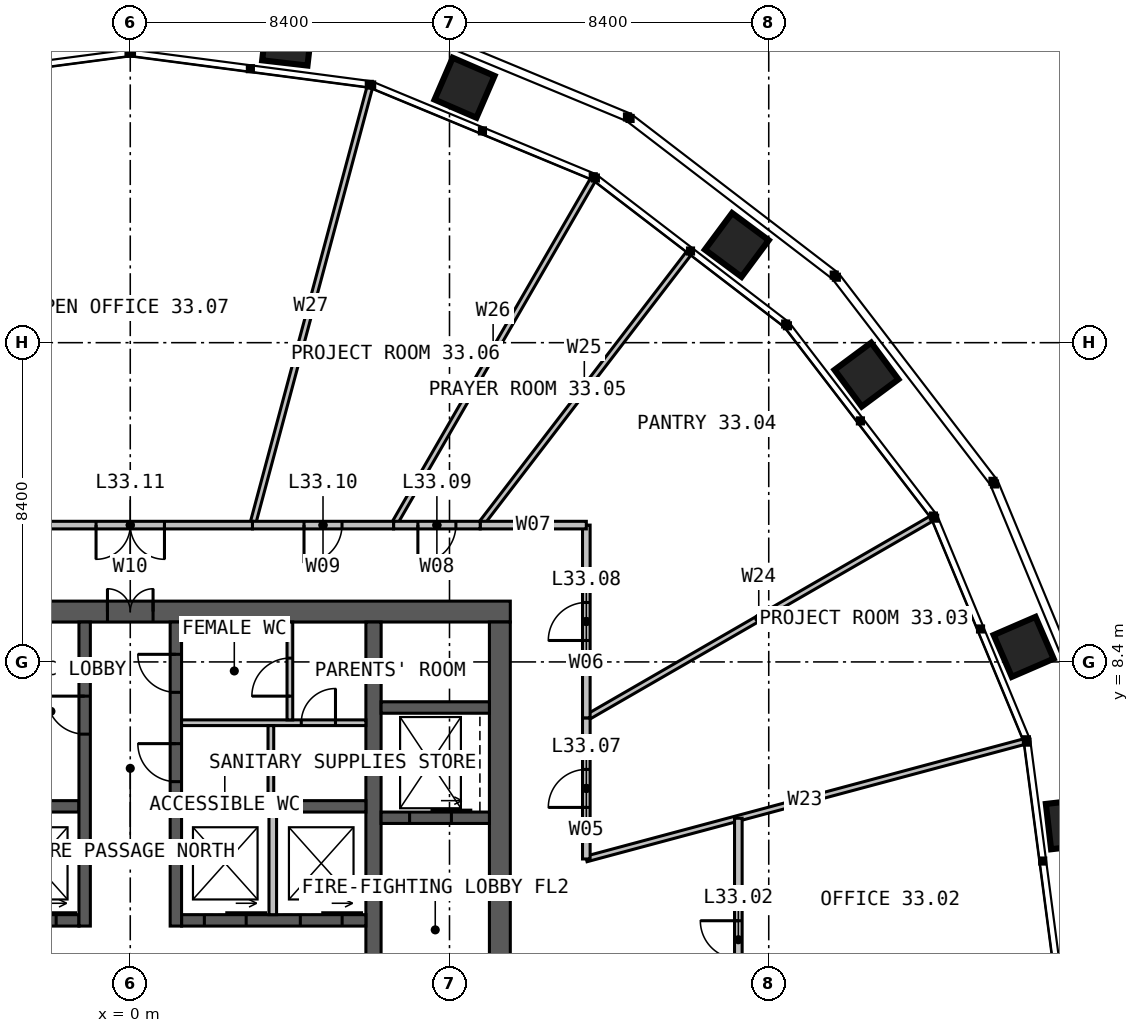
"""IFC4 building model, lengths in metres.
Left out: names, types, materials, properties, quantities, classifications, styles, units other than length and angle.
Written with IfcOpenShell. Run it as: python <this file> out.ifc"""

import sys

from ifc_helpers import new_model, si_unit, direction, frame, frame_2d, origin, place, context, subcontext, project, spatial, rectangle, extrude, element, fill, save


model = new_model("IFC4")
c1 = context("Model", 3, precision=1e-05, world=origin(), true_north=direction((0.0, 1.0)))
c2 = subcontext(c1, "Body", "Model", "MODEL_VIEW")
j1 = project(units=[si_unit("LENGTHUNIT", "METRE"), si_unit("PLANEANGLEUNIT", "RADIAN")], contexts=[c1])
p1 = place(None, origin())
s1 = spatial("IfcSite", under=j1, at=p1, CompositionType="ELEMENT")
p2 = place(p1, origin())
s2 = spatial("IfcBuilding", under=s1, at=p2, CompositionType="ELEMENT")
p3 = place(p2, frame((0.0, 0.0, 138.0)))
s3 = spatial("IfcBuildingStorey", under=s2, at=p3, CompositionType="ELEMENT", Elevation=138.0)
p4 = place(p3, frame((-10.0, 9.725, 0.0), z_axis=(0.0, 0.0, 1.0), x_axis=(1.0, 0.0, 0.0)))
e1 = element("IfcWall", 1, at=p4, inside=s3, PredefinedType="SOLIDWALL", context=c2, shape_type="SweptSolid", body=[
    extrude(rectangle(XDim=20.0, YDim=0.55, at=frame_2d((10.0, 0.0))), origin(), (0.0, 0.0, 1.0), 4.0),
])
p5 = place(p4, frame((9.4, 0.0, 0.0)))
e2 = element("IfcOpeningElement", 2, at=p5, cuts=e1, PredefinedType="OPENING", context=c2, shape_type="SweptSolid", body=[
    extrude(rectangle(XDim=1.2, YDim=2.2, at=frame_2d((0.6, 1.1))), frame((0.0, 0.285, 0.0), z_axis=(0.0, -1.0, 0.0), x_axis=(1.0, 0.0, 0.0)), (0.0, 0.0, 1.0), 0.57),
])
p6 = place(p3, frame((9.725, -9.45, 0.0), z_axis=(0.0, 0.0, 1.0), x_axis=(0.0, 1.0, 0.0)))
e3 = element("IfcWall", 3, at=p6, inside=s3, PredefinedType="SOLIDWALL", context=c2, shape_type="SweptSolid", body=[
    extrude(rectangle(XDim=18.9, YDim=0.55, at=frame_2d((9.45, 0.0))), origin(), (0.0, 0.0, 1.0), 4.0),
])
p7 = place(p3, frame((6.4, 9.45, 0.0), z_axis=(0.0, 0.0, 1.0), x_axis=(0.0, -1.0, 0.0)))
e4 = element("IfcWall", 4, at=p7, inside=s3, PredefinedType="SOLIDWALL", context=c2, shape_type="SweptSolid", body=[
    extrude(rectangle(XDim=18.9, YDim=0.4, at=frame_2d((9.45, 0.0))), origin(), (0.0, 0.0, 1.0), 4.0),
])
p8 = place(p7, frame((8.95, 0.0, 0.0)))
e5 = element("IfcOpeningElement", 5, at=p8, cuts=e4, PredefinedType="OPENING", context=c2, shape_type="SweptSolid", body=[
    extrude(rectangle(XDim=1.0, YDim=2.2, at=frame_2d((0.5, 1.1))), frame((0.0, 0.21, 0.0), z_axis=(0.0, -1.0, 0.0), x_axis=(1.0, 0.0, 0.0)), (0.0, 0.0, 1.0), 0.42),
])
p9 = place(p3, frame((-6.2, 1.6, 0.0), z_axis=(0.0, 0.0, 1.0), x_axis=(1.0, 0.0, 0.0)))
e6 = element("IfcWall", 6, at=p9, inside=s3, PredefinedType="SOLIDWALL", context=c2, shape_type="SweptSolid", body=[
    extrude(rectangle(XDim=4.85, YDim=0.3, at=frame_2d((2.425, 0.0))), origin(), (0.0, 0.0, 1.0), 4.0),
])
p10 = place(p9, frame((0.625, 0.0, 0.0)))
e7 = element("IfcOpeningElement", 7, at=p10, cuts=e6, PredefinedType="OPENING", context=c2, shape_type="SweptSolid", body=[
    extrude(rectangle(XDim=1.1, YDim=2.2, at=frame_2d((0.55, 1.1))), frame((0.0, 0.16, 0.0), z_axis=(0.0, -1.0, 0.0), x_axis=(1.0, 0.0, 0.0)), (0.0, 0.0, 1.0), 0.32),
])
p11 = place(p9, frame((3.15, 0.0, 0.0)))
e8 = element("IfcOpeningElement", 8, at=p11, cuts=e6, PredefinedType="OPENING", context=c2, shape_type="SweptSolid", body=[
    extrude(rectangle(XDim=1.1, YDim=2.2, at=frame_2d((0.55, 1.1))), frame((0.0, 0.16, 0.0), z_axis=(0.0, -1.0, 0.0), x_axis=(1.0, 0.0, 0.0)), (0.0, 0.0, 1.0), 0.32),
])
p12 = place(p3, frame((1.35, 1.6, 0.0), z_axis=(0.0, 0.0, 1.0), x_axis=(1.0, 0.0, 0.0)))
e9 = element("IfcWall", 9, at=p12, inside=s3, PredefinedType="SOLIDWALL", context=c2, shape_type="SweptSolid", body=[
    extrude(rectangle(XDim=4.85, YDim=0.3, at=frame_2d((2.425, 0.0))), origin(), (0.0, 0.0, 1.0), 4.0),
])
p13 = place(p12, frame((0.6, 0.0, 0.0)))
e10 = element("IfcOpeningElement", 10, at=p13, cuts=e9, PredefinedType="OPENING", context=c2, shape_type="SweptSolid", body=[
    extrude(rectangle(XDim=1.1, YDim=2.2, at=frame_2d((0.55, 1.1))), frame((0.0, 0.16, 0.0), z_axis=(0.0, -1.0, 0.0), x_axis=(1.0, 0.0, 0.0)), (0.0, 0.0, 1.0), 0.32),
])
p14 = place(p12, frame((3.125, 0.0, 0.0)))
e11 = element("IfcOpeningElement", 11, at=p14, cuts=e9, PredefinedType="OPENING", context=c2, shape_type="SweptSolid", body=[
    extrude(rectangle(XDim=1.1, YDim=2.2, at=frame_2d((0.55, 1.1))), frame((0.0, 0.16, 0.0), z_axis=(0.0, -1.0, 0.0), x_axis=(1.0, 0.0, 0.0)), (0.0, 0.0, 1.0), 0.32),
])
for number, where, z_axis, x_axis in (
    (12, (-6.2, 4.6, 0.0), (0.0, 0.0, 1.0), (1.0, 0.0, 0.0)),
    (13, (1.35, 4.6, 0.0), (0.0, 0.0, 1.0), (1.0, 0.0, 0.0)),
):
    element("IfcWall", number, at=place(p3, frame(where, z_axis=z_axis, x_axis=x_axis)), inside=s3, PredefinedType="SOLIDWALL", context=c2, shape_type="SweptSolid", body=[
        extrude(rectangle(XDim=4.85, YDim=0.3, at=frame_2d((2.425, 0.0))), origin(), (0.0, 0.0, 1.0), 4.0),
    ])
p15 = place(p3, frame((-1.2, 1.45, 0.0), z_axis=(0.0, 0.0, 1.0), x_axis=(0.0, 1.0, 0.0)))
e14 = element("IfcWall", 14, at=p15, inside=s3, PredefinedType="SOLIDWALL", context=c2, shape_type="SweptSolid", body=[
    extrude(rectangle(XDim=8.0, YDim=0.3, at=frame_2d((4.0, 0.0))), origin(), (0.0, 0.0, 1.0), 4.0),
])
p16 = place(p15, frame((5.05, 0.0, 0.0)))
e15 = element("IfcOpeningElement", 15, at=p16, cuts=e14, PredefinedType="OPENING", context=c2, shape_type="SweptSolid", body=[
    extrude(rectangle(XDim=1.0, YDim=2.2, at=frame_2d((0.5, 1.1))), frame((0.0, 0.16, 0.0), z_axis=(0.0, -1.0, 0.0), x_axis=(1.0, 0.0, 0.0)), (0.0, 0.0, 1.0), 0.32),
])
p17 = place(p3, frame((1.2, 1.45, 0.0), z_axis=(0.0, 0.0, 1.0), x_axis=(0.0, 1.0, 0.0)))
e16 = element("IfcWall", 16, at=p17, inside=s3, PredefinedType="SOLIDWALL", context=c2, shape_type="SweptSolid", body=[
    extrude(rectangle(XDim=8.0, YDim=0.3, at=frame_2d((4.0, 0.0))), origin(), (0.0, 0.0, 1.0), 4.0),
])
p18 = place(p17, frame((3.8, 0.0, 0.0)))
e17 = element("IfcOpeningElement", 17, at=p18, cuts=e16, PredefinedType="OPENING", context=c2, shape_type="SweptSolid", body=[
    extrude(rectangle(XDim=1.0, YDim=2.2, at=frame_2d((0.5, 1.1))), frame((0.0, 0.16, 0.0), z_axis=(0.0, -1.0, 0.0), x_axis=(1.0, 0.0, 0.0)), (0.0, 0.0, 1.0), 0.32),
])
p19 = place(p17, frame((6.15, 0.0, 0.0)))
e18 = element("IfcOpeningElement", 18, at=p19, cuts=e16, PredefinedType="OPENING", context=c2, shape_type="SweptSolid", body=[
    extrude(rectangle(XDim=1.0, YDim=2.2, at=frame_2d((0.5, 1.1))), frame((0.0, 0.16, 0.0), z_axis=(0.0, -1.0, 0.0), x_axis=(1.0, 0.0, 0.0)), (0.0, 0.0, 1.0), 0.32),
])
p20 = place(p3, frame((6.6, 4.3, 0.0), z_axis=(0.0, 0.0, 1.0), x_axis=(1.0, 0.0, 0.0)))
e19 = element("IfcWall", 19, at=p20, inside=s3, PredefinedType="SOLIDWALL", context=c2, shape_type="SweptSolid", body=[
    extrude(rectangle(XDim=2.85, YDim=0.3, at=frame_2d((1.425, 0.0))), origin(), (0.0, 0.0, 1.0), 4.0),
])
p21 = place(p20, frame((0.75, 0.0, 0.0)))
e20 = element("IfcOpeningElement", 20, at=p21, cuts=e19, PredefinedType="OPENING", context=c2, shape_type="SweptSolid", body=[
    extrude(rectangle(XDim=1.1, YDim=2.2, at=frame_2d((0.55, 1.1))), frame((0.0, 0.16, 0.0), z_axis=(0.0, -1.0, 0.0), x_axis=(1.0, 0.0, 0.0)), (0.0, 0.0, 1.0), 0.32),
])
p22 = place(p3, frame((6.6, 7.2, 0.0), z_axis=(0.0, 0.0, 1.0), x_axis=(1.0, 0.0, 0.0)))
e21 = element("IfcWall", 21, at=p22, inside=s3, PredefinedType="SOLIDWALL", context=c2, shape_type="SweptSolid", body=[
    extrude(rectangle(XDim=2.85, YDim=0.3, at=frame_2d((1.425, 0.0))), origin(), (0.0, 0.0, 1.0), 4.0),
])
p23 = place(p3, frame((3.75, 1.75, 0.0), z_axis=(0.0, 0.0, 1.0), x_axis=(0.0, 1.0, 0.0)))
e22 = element("IfcWall", 22, at=p23, inside=s3, PredefinedType="SOLIDWALL", context=c2, shape_type="SweptSolid", body=[
    extrude(rectangle(XDim=2.7, YDim=0.2, at=frame_2d((1.35, 0.0))), origin(), (0.0, 0.0, 1.0), 3.75),
])
p24 = place(p3, frame((1.35, 6.8, 0.0), z_axis=(0.0, 0.0, 1.0), x_axis=(1.0, 0.0, 0.0)))
e23 = element("IfcWall", 23, at=p24, inside=s3, PredefinedType="PARTITIONING", context=c2, shape_type="SweptSolid", body=[
    extrude(rectangle(XDim=4.85, YDim=0.15, at=frame_2d((2.425, 0.0))), origin(), (0.0, 0.0, 1.0), 3.75),
])
p25 = place(p24, frame((3.15, 0.0, 0.0)))
e24 = element("IfcOpeningElement", 24, at=p25, cuts=e23, PredefinedType="OPENING", context=c2, shape_type="SweptSolid", body=[
    extrude(rectangle(XDim=0.9, YDim=2.2, at=frame_2d((0.45, 1.1))), frame((0.0, 0.085, 0.0), z_axis=(0.0, -1.0, 0.0), x_axis=(1.0, 0.0, 0.0)), (0.0, 0.0, 1.0), 0.17),
])
p26 = place(p3, frame((3.7, 4.75, 0.0), z_axis=(0.0, 0.0, 1.0), x_axis=(0.0, 1.0, 0.0)))
e25 = element("IfcWall", 25, at=p26, inside=s3, PredefinedType="PARTITIONING", context=c2, shape_type="SweptSolid", body=[
    extrude(rectangle(XDim=1.975, YDim=0.15, at=frame_2d((0.988, 0.0))), origin(), (0.0, 0.0, 1.0), 3.75),
])
p27 = place(p3, frame((4.2, 6.875, 0.0), z_axis=(0.0, 0.0, 1.0), x_axis=(0.0, 1.0, 0.0)))
e26 = element("IfcWall", 26, at=p27, inside=s3, PredefinedType="PARTITIONING", context=c2, shape_type="SweptSolid", body=[
    extrude(rectangle(XDim=2.575, YDim=0.15, at=frame_2d((1.288, 0.0))), origin(), (0.0, 0.0, 1.0), 3.75),
])
p28 = place(p27, frame((0.625, 0.0, 0.0)))
e27 = element("IfcOpeningElement", 27, at=p28, cuts=e26, PredefinedType="OPENING", context=c2, shape_type="SweptSolid", body=[
    extrude(rectangle(XDim=1.0, YDim=2.2, at=frame_2d((0.5, 1.1))), frame((0.0, 0.085, 0.0), z_axis=(0.0, -1.0, 0.0), x_axis=(1.0, 0.0, 0.0)), (0.0, 0.0, 1.0), 0.17),
])
p29 = place(p3, frame((12.0, 3.215, 0.0), z_axis=(0.0, 0.0, 1.0), x_axis=(0.965926367889, 0.258817023816, 0.0)))
e28 = element("IfcWall", 28, at=p29, inside=s3, PredefinedType="PARTITIONING", context=c2, shape_type="SweptSolid", body=[
    extrude(rectangle(XDim=11.911, YDim=0.15, at=frame_2d((5.956, 0.0))), origin(), (0.0, 0.0, 1.0), 2.79),
])
p30 = place(p3, frame((12.0, 6.928, 0.0), z_axis=(0.0, 0.0, 1.0), x_axis=(0.866029212144, 0.49999340367, 0.0)))
e29 = element("IfcWall", 29, at=p30, inside=s3, PredefinedType="PARTITIONING", context=c2, shape_type="SweptSolid", body=[
    extrude(rectangle(XDim=10.478, YDim=0.15, at=frame_2d((5.239, 0.0))), origin(), (0.0, 0.0, 1.0), 2.79),
])
p31 = place(p3, frame((9.208, 12.0, 0.0), z_axis=(0.0, 0.0, 1.0), x_axis=(0.608761217002, 0.79335350297, 0.0)))
e30 = element("IfcWall", 30, at=p31, inside=s3, PredefinedType="PARTITIONING", context=c2, shape_type="SweptSolid", body=[
    extrude(rectangle(XDim=9.0, YDim=0.15, at=frame_2d((4.5, 0.0))), origin(), (0.0, 0.0, 1.0), 2.79),
])
p32 = place(p3, frame((6.928, 12.0, 0.0), z_axis=(0.0, 0.0, 1.0), x_axis=(0.49999340367, 0.866029212144, 0.0)))
e31 = element("IfcWall", 31, at=p32, inside=s3, PredefinedType="PARTITIONING", context=c2, shape_type="SweptSolid", body=[
    extrude(rectangle(XDim=10.478, YDim=0.15, at=frame_2d((5.239, 0.0))), origin(), (0.0, 0.0, 1.0), 2.79),
])
p33 = place(p3, frame((3.215, 12.0, 0.0), z_axis=(0.0, 0.0, 1.0), x_axis=(0.258817023816, 0.965926367889, 0.0)))
e32 = element("IfcWall", 32, at=p33, inside=s3, PredefinedType="PARTITIONING", context=c2, shape_type="SweptSolid", body=[
    extrude(rectangle(XDim=11.911, YDim=0.15, at=frame_2d((5.956, 0.0))), origin(), (0.0, 0.0, 1.0), 2.79),
])
p34 = place(p3, frame((16.0, -5.152, 0.0), z_axis=(0.0, 0.0, 1.0), x_axis=(0.0, 1.0, 0.0)))
e33 = element("IfcWall", 33, at=p34, inside=s3, PredefinedType="PARTITIONING", context=c2, shape_type="SweptSolid", body=[
    extrude(rectangle(XDim=9.439, YDim=0.2, at=frame_2d((4.72, 0.0))), origin(), (0.0, 0.0, 1.0), 3.8),
])
p35 = place(p34, frame((5.742, 0.0, 0.0)))
e34 = element("IfcOpeningElement", 34, at=p35, cuts=e33, PredefinedType="OPENING", context=c2, shape_type="SweptSolid", body=[
    extrude(rectangle(XDim=1.0, YDim=2.2, at=frame_2d((0.5, 1.1))), frame((0.0, 0.11, 0.0), z_axis=(0.0, -1.0, 0.0), x_axis=(1.0, 0.0, 0.0)), (0.0, 0.0, 1.0), 0.22),
])
p36 = place(p3, frame((12.0, 3.215, 0.0), z_axis=(0.0, 0.0, 1.0), x_axis=(0.0, 1.0, 0.0)))
e35 = element("IfcWall", 35, at=p36, inside=s3, PredefinedType="PARTITIONING", context=c2, shape_type="SweptSolid", body=[
    extrude(rectangle(XDim=3.713, YDim=0.2, at=frame_2d((1.856, 0.0))), origin(), (0.0, 0.0, 1.0), 3.8),
])
p37 = place(p36, frame((1.356, 0.0, 0.0)))
e36 = element("IfcOpeningElement", 36, at=p37, cuts=e35, PredefinedType="OPENING", context=c2, shape_type="SweptSolid", body=[
    extrude(rectangle(XDim=1.0, YDim=2.2, at=frame_2d((0.5, 1.1))), frame((0.0, 0.11, 0.0), z_axis=(0.0, -1.0, 0.0), x_axis=(1.0, 0.0, 0.0)), (0.0, 0.0, 1.0), 0.22),
])
p38 = place(p3, frame((12.0, 6.928, 0.0), z_axis=(0.0, 0.0, 1.0), x_axis=(0.0, 1.0, 0.0)))
e37 = element("IfcWall", 37, at=p38, inside=s3, PredefinedType="PARTITIONING", context=c2, shape_type="SweptSolid", body=[
    extrude(rectangle(XDim=5.072, YDim=0.2, at=frame_2d((2.536, 0.0))), origin(), (0.0, 0.0, 1.0), 3.8),
])
p39 = place(p38, frame((2.036, 0.0, 0.0)))
e38 = element("IfcOpeningElement", 38, at=p39, cuts=e37, PredefinedType="OPENING", context=c2, shape_type="SweptSolid", body=[
    extrude(rectangle(XDim=1.0, YDim=2.2, at=frame_2d((0.5, 1.1))), frame((0.0, 0.11, 0.0), z_axis=(0.0, -1.0, 0.0), x_axis=(1.0, 0.0, 0.0)), (0.0, 0.0, 1.0), 0.22),
])
p40 = place(p3, frame((12.0, 12.0, 0.0), z_axis=(0.0, 0.0, 1.0), x_axis=(-1.0, 0.0, 0.0)))
e39 = element("IfcWall", 39, at=p40, inside=s3, PredefinedType="PARTITIONING", context=c2, shape_type="SweptSolid", body=[
    extrude(rectangle(XDim=2.792, YDim=0.2, at=frame_2d((1.396, 0.0))), origin(), (0.0, 0.0, 1.0), 3.8),
])
p41 = place(p3, frame((9.208, 12.0, 0.0), z_axis=(0.0, 0.0, 1.0), x_axis=(-1.0, 0.0, 0.0)))
e40 = element("IfcWall", 40, at=p41, inside=s3, PredefinedType="PARTITIONING", context=c2, shape_type="SweptSolid", body=[
    extrude(rectangle(XDim=2.28, YDim=0.2, at=frame_2d((1.14, 0.0))), origin(), (0.0, 0.0, 1.0), 3.8),
])
p42 = place(p41, frame((0.64, 0.0, 0.0)))
e41 = element("IfcOpeningElement", 41, at=p42, cuts=e40, PredefinedType="OPENING", context=c2, shape_type="SweptSolid", body=[
    extrude(rectangle(XDim=1.0, YDim=2.2, at=frame_2d((0.5, 1.1))), frame((0.0, 0.11, 0.0), z_axis=(0.0, -1.0, 0.0), x_axis=(1.0, 0.0, 0.0)), (0.0, 0.0, 1.0), 0.22),
])
p43 = place(p3, frame((6.928, 12.0, 0.0), z_axis=(0.0, 0.0, 1.0), x_axis=(-1.0, 0.0, 0.0)))
e42 = element("IfcWall", 42, at=p43, inside=s3, PredefinedType="PARTITIONING", context=c2, shape_type="SweptSolid", body=[
    extrude(rectangle(XDim=3.713, YDim=0.2, at=frame_2d((1.856, 0.0))), origin(), (0.0, 0.0, 1.0), 3.8),
])
p44 = place(p43, frame((1.356, 0.0, 0.0)))
e43 = element("IfcOpeningElement", 43, at=p44, cuts=e42, PredefinedType="OPENING", context=c2, shape_type="SweptSolid", body=[
    extrude(rectangle(XDim=1.0, YDim=2.2, at=frame_2d((0.5, 1.1))), frame((0.0, 0.11, 0.0), z_axis=(0.0, -1.0, 0.0), x_axis=(1.0, 0.0, 0.0)), (0.0, 0.0, 1.0), 0.22),
])
p45 = place(p3, frame((3.215, 12.0, 0.0), z_axis=(0.0, 0.0, 1.0), x_axis=(-1.0, 0.0, 0.0)))
e44 = element("IfcWall", 44, at=p45, inside=s3, PredefinedType="PARTITIONING", context=c2, shape_type="SweptSolid", body=[
    extrude(rectangle(XDim=6.431, YDim=0.2, at=frame_2d((3.215, 0.0))), origin(), (0.0, 0.0, 1.0), 3.8),
])
p46 = place(p45, frame((2.315, 0.0, 0.0)))
e45 = element("IfcOpeningElement", 45, at=p46, cuts=e44, PredefinedType="OPENING", context=c2, shape_type="SweptSolid", body=[
    extrude(rectangle(XDim=1.8, YDim=2.2, at=frame_2d((0.9, 1.1))), frame((0.0, 0.11, 0.0), z_axis=(0.0, -1.0, 0.0), x_axis=(1.0, 0.0, 0.0)), (0.0, 0.0, 1.0), 0.22),
])
p47 = place(p5, origin())
e46 = element("IfcDoor", 46, at=p47, inside=s3, OperationType="DOUBLE_DOOR_SINGLE_SWING", PredefinedType="DOOR", context=c2, shape_type="SweptSolid", body=[
    extrude(rectangle(XDim=1.2, YDim=2.2, at=frame_2d((0.6, 1.1))), frame((0.0, 0.025, 0.0), z_axis=(0.0, -1.0, 0.0), x_axis=(1.0, 0.0, 0.0)), (0.0, 0.0, 1.0), 0.05),
])
fill(e2, e46)
p48 = place(p16, origin())
e47 = element("IfcDoor", 47, at=p48, inside=s3, OperationType="SINGLE_SWING_RIGHT", PredefinedType="DOOR", context=c2, shape_type="SweptSolid", body=[
    extrude(rectangle(XDim=1.0, YDim=2.2, at=frame_2d((0.5, 1.1))), frame((0.0, 0.025, 0.0), z_axis=(0.0, -1.0, 0.0), x_axis=(1.0, 0.0, 0.0)), (0.0, 0.0, 1.0), 0.05),
])
fill(e15, e47)
p49 = place(p18, origin())
e48 = element("IfcDoor", 48, at=p49, inside=s3, OperationType="SINGLE_SWING_RIGHT", PredefinedType="DOOR", context=c2, shape_type="SweptSolid", body=[
    extrude(rectangle(XDim=1.0, YDim=2.2, at=frame_2d((0.5, 1.1))), frame((0.0, 0.025, 0.0), z_axis=(0.0, -1.0, 0.0), x_axis=(1.0, 0.0, 0.0)), (0.0, 0.0, 1.0), 0.05),
])
fill(e17, e48)
p50 = place(p19, origin())
e49 = element("IfcDoor", 49, at=p50, inside=s3, OperationType="SINGLE_SWING_RIGHT", PredefinedType="DOOR", context=c2, shape_type="SweptSolid", body=[
    extrude(rectangle(XDim=1.0, YDim=2.2, at=frame_2d((0.5, 1.1))), frame((0.0, 0.025, 0.0), z_axis=(0.0, -1.0, 0.0), x_axis=(1.0, 0.0, 0.0)), (0.0, 0.0, 1.0), 0.05),
])
fill(e18, e49)
p51 = place(p25, origin())
e50 = element("IfcDoor", 50, at=p51, inside=s3, OperationType="SINGLE_SWING_RIGHT", PredefinedType="DOOR", context=c2, shape_type="SweptSolid", body=[
    extrude(rectangle(XDim=0.9, YDim=2.2, at=frame_2d((0.45, 1.1))), frame((0.0, 0.025, 0.0), z_axis=(0.0, -1.0, 0.0), x_axis=(1.0, 0.0, 0.0)), (0.0, 0.0, 1.0), 0.05),
])
fill(e24, e50)
p52 = place(p28, origin())
e51 = element("IfcDoor", 51, at=p52, inside=s3, OperationType="SINGLE_SWING_LEFT", PredefinedType="DOOR", context=c2, shape_type="SweptSolid", body=[
    extrude(rectangle(XDim=1.0, YDim=2.2, at=frame_2d((0.5, 1.1))), frame((0.0, 0.025, 0.0), z_axis=(0.0, -1.0, 0.0), x_axis=(1.0, 0.0, 0.0)), (0.0, 0.0, 1.0), 0.05),
])
fill(e27, e51)
p53 = place(p11, origin())
e52 = element("IfcDoor", 52, at=p53, inside=s3, OperationType="SLIDING_TO_LEFT", PredefinedType="DOOR", context=c2, shape_type="SweptSolid", body=[
    extrude(rectangle(XDim=1.1, YDim=2.2, at=frame_2d((0.55, 1.1))), frame((0.0, 0.025, 0.0), z_axis=(0.0, -1.0, 0.0), x_axis=(1.0, 0.0, 0.0)), (0.0, 0.0, 1.0), 0.05),
])
fill(e8, e52)
p54 = place(p13, origin())
e53 = element("IfcDoor", 53, at=p54, inside=s3, OperationType="SLIDING_TO_LEFT", PredefinedType="DOOR", context=c2, shape_type="SweptSolid", body=[
    extrude(rectangle(XDim=1.1, YDim=2.2, at=frame_2d((0.55, 1.1))), frame((0.0, 0.025, 0.0), z_axis=(0.0, -1.0, 0.0), x_axis=(1.0, 0.0, 0.0)), (0.0, 0.0, 1.0), 0.05),
])
fill(e10, e53)
p55 = place(p14, origin())
e54 = element("IfcDoor", 54, at=p55, inside=s3, OperationType="SLIDING_TO_LEFT", PredefinedType="DOOR", context=c2, shape_type="SweptSolid", body=[
    extrude(rectangle(XDim=1.1, YDim=2.2, at=frame_2d((0.55, 1.1))), frame((0.0, 0.025, 0.0), z_axis=(0.0, -1.0, 0.0), x_axis=(1.0, 0.0, 0.0)), (0.0, 0.0, 1.0), 0.05),
])
fill(e11, e54)
p56 = place(p21, origin())
e55 = element("IfcDoor", 55, at=p56, inside=s3, OperationType="SLIDING_TO_LEFT", PredefinedType="DOOR", context=c2, shape_type="SweptSolid", body=[
    extrude(rectangle(XDim=1.1, YDim=2.2, at=frame_2d((0.55, 1.1))), frame((0.0, 0.025, 0.0), z_axis=(0.0, -1.0, 0.0), x_axis=(1.0, 0.0, 0.0)), (0.0, 0.0, 1.0), 0.05),
])
fill(e20, e55)
p57 = place(p35, origin())
e56 = element("IfcDoor", 56, at=p57, inside=s3, OperationType="SINGLE_SWING_RIGHT", PredefinedType="DOOR", context=c2, shape_type="SweptSolid", body=[
    extrude(rectangle(XDim=1.0, YDim=2.2, at=frame_2d((0.5, 1.1))), frame((0.0, 0.025, 0.0), z_axis=(0.0, -1.0, 0.0), x_axis=(1.0, 0.0, 0.0)), (0.0, 0.0, 1.0), 0.05),
])
fill(e34, e56)
p58 = place(p37, origin())
e57 = element("IfcDoor", 57, at=p58, inside=s3, OperationType="SINGLE_SWING_LEFT", PredefinedType="DOOR", context=c2, shape_type="SweptSolid", body=[
    extrude(rectangle(XDim=1.0, YDim=2.2, at=frame_2d((0.5, 1.1))), frame((0.0, 0.025, 0.0), z_axis=(0.0, -1.0, 0.0), x_axis=(1.0, 0.0, 0.0)), (0.0, 0.0, 1.0), 0.05),
])
fill(e36, e57)
p59 = place(p39, origin())
e58 = element("IfcDoor", 58, at=p59, inside=s3, OperationType="SINGLE_SWING_LEFT", PredefinedType="DOOR", context=c2, shape_type="SweptSolid", body=[
    extrude(rectangle(XDim=1.0, YDim=2.2, at=frame_2d((0.5, 1.1))), frame((0.0, 0.025, 0.0), z_axis=(0.0, -1.0, 0.0), x_axis=(1.0, 0.0, 0.0)), (0.0, 0.0, 1.0), 0.05),
])
fill(e38, e58)
p60 = place(p42, origin())
e59 = element("IfcDoor", 59, at=p60, inside=s3, OperationType="SINGLE_SWING_RIGHT", PredefinedType="DOOR", context=c2, shape_type="SweptSolid", body=[
    extrude(rectangle(XDim=1.0, YDim=2.2, at=frame_2d((0.5, 1.1))), frame((0.0, 0.025, 0.0), z_axis=(0.0, -1.0, 0.0), x_axis=(1.0, 0.0, 0.0)), (0.0, 0.0, 1.0), 0.05),
])
fill(e41, e59)
p61 = place(p44, origin())
e60 = element("IfcDoor", 60, at=p61, inside=s3, OperationType="SINGLE_SWING_RIGHT", PredefinedType="DOOR", context=c2, shape_type="SweptSolid", body=[
    extrude(rectangle(XDim=1.0, YDim=2.2, at=frame_2d((0.5, 1.1))), frame((0.0, 0.025, 0.0), z_axis=(0.0, -1.0, 0.0), x_axis=(1.0, 0.0, 0.0)), (0.0, 0.0, 1.0), 0.05),
])
fill(e43, e60)
p62 = place(p46, origin())
e61 = element("IfcDoor", 61, at=p62, inside=s3, OperationType="DOUBLE_DOOR_SINGLE_SWING", PredefinedType="DOOR", context=c2, shape_type="SweptSolid", body=[
    extrude(rectangle(XDim=1.8, YDim=2.2, at=frame_2d((0.9, 1.1))), frame((0.0, 0.025, 0.0), z_axis=(0.0, -1.0, 0.0), x_axis=(1.0, 0.0, 0.0)), (0.0, 0.0, 1.0), 0.05),
])
fill(e45, e61)
save(model, sys.argv[1])
